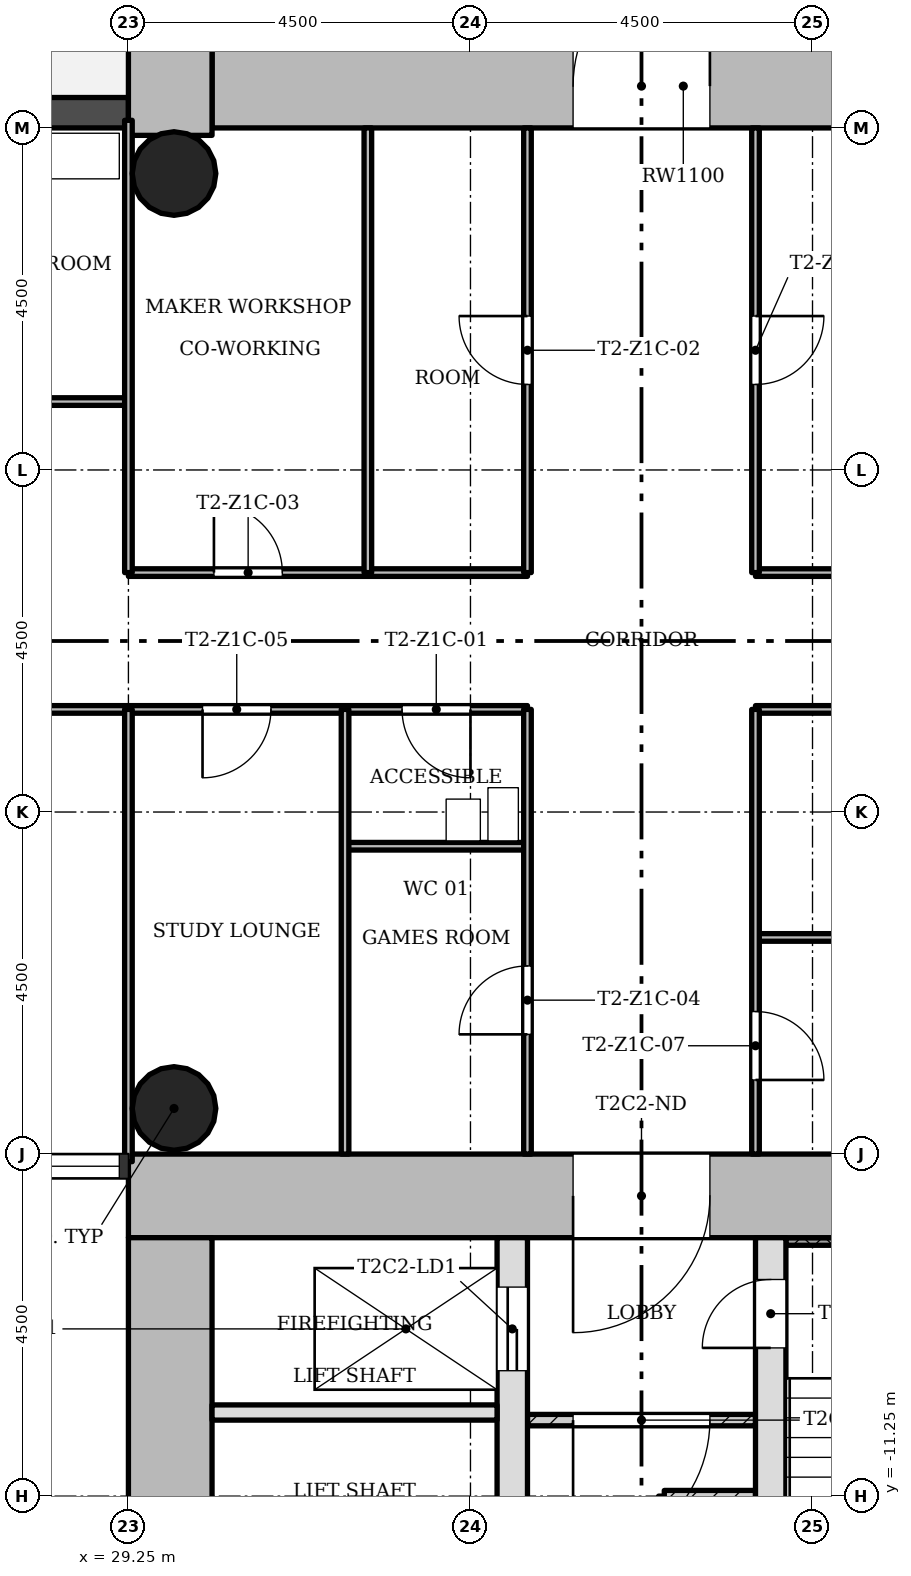
"""IFC4 building model, lengths in metres.
Left out: names, types, materials, properties, quantities, classifications, styles, units other than length and angle.
Written with IfcOpenShell. Run it as: python <this file> out.ifc"""

import sys

from ifc_helpers import new_model, si_unit, direction, frame, frame_2d, origin, origin_2d, place, context, subcontext, project, spatial, rectangle, hollow_circle, extrude, element, fill, save


model = new_model("IFC4")
c1 = context("Model", 3, precision=1e-05, world=origin(), true_north=direction((0.0, 1.0)))
c2 = subcontext(c1, "Body", "Model", "MODEL_VIEW")
j1 = project(units=[si_unit("LENGTHUNIT", "METRE"), si_unit("PLANEANGLEUNIT", "RADIAN")], contexts=[c1])
p1 = place(None, origin())
s1 = spatial("IfcSite", under=j1, at=p1, CompositionType="ELEMENT")
p2 = place(p1, origin())
s2 = spatial("IfcBuilding", under=s1, at=p2, CompositionType="ELEMENT")
p3 = place(p2, frame((0.0, 0.0, 44.9)))
s3 = spatial("IfcBuildingStorey", under=s2, at=p3, CompositionType="ELEMENT", Elevation=44.9)
p4 = place(p3, frame((30.35, 7.3, 0.0), z_axis=(0.0, 0.0, 1.0), x_axis=(1.0, 0.0, 0.0)))
e1 = element("IfcWall", 1, at=p4, inside=s3, PredefinedType="SHEAR", context=c2, shape_type="SweptSolid", body=[
    extrude(rectangle(XDim=12.4, YDim=1.1, at=frame_2d((6.2, 0.0))), origin(), (0.0, 0.0, 1.0), 3.4),
])
p5 = place(p4, frame((4.75, 0.0, 0.0)))
e2 = element("IfcOpeningElement", 2, at=p5, cuts=e1, PredefinedType="OPENING", context=c2, shape_type="SweptSolid", body=[
    extrude(rectangle(XDim=1.8, YDim=2.1, at=frame_2d((0.9, 1.05))), frame((0.0, 0.56, 0.0), z_axis=(0.0, -1.0, 0.0), x_axis=(1.0, 0.0, 0.0)), (0.0, 0.0, 1.0), 1.12),
])
p6 = place(p3, frame((29.8, 15.248, 0.0), z_axis=(0.0, 0.0, 1.0), x_axis=(0.0, -1.0, 0.0)))
e3 = element("IfcWall", 3, at=p6, inside=s3, PredefinedType="SHEAR", context=c2, shape_type="SweptSolid", body=[
    extrude(rectangle(XDim=8.596, YDim=1.1, at=frame_2d((4.298, 0.0))), origin(), (0.0, 0.0, 1.0), 3.4),
])
p7 = place(p3, frame((41.65, -7.3, 0.0), z_axis=(0.0, 0.0, 1.0), x_axis=(-1.0, 0.0, 0.0)))
e4 = element("IfcWall", 4, at=p7, inside=s3, PredefinedType="SHEAR", context=c2, shape_type="SweptSolid", body=[
    extrude(rectangle(XDim=12.4, YDim=1.1, at=frame_2d((6.2, 0.0))), origin(), (0.0, 0.0, 1.0), 3.4),
])
p8 = place(p7, frame((4.75, 0.0, 0.0)))
e5 = element("IfcOpeningElement", 5, at=p8, cuts=e4, PredefinedType="OPENING", context=c2, shape_type="SweptSolid", body=[
    extrude(rectangle(XDim=1.8, YDim=2.1, at=frame_2d((0.9, 1.05))), frame((0.0, 0.56, 0.0), z_axis=(0.0, -1.0, 0.0), x_axis=(1.0, 0.0, 0.0)), (0.0, 0.0, 1.0), 1.12),
])
p9 = place(p3, frame((29.8, -7.85, 0.0), z_axis=(0.0, 0.0, 1.0), x_axis=(0.0, -1.0, 0.0)))
e6 = element("IfcWall", 6, at=p9, inside=s3, PredefinedType="SHEAR", context=c2, shape_type="SweptSolid", body=[
    extrude(rectangle(XDim=7.9, YDim=1.1, at=frame_2d((3.95, 0.0))), origin(), (0.0, 0.0, 1.0), 3.4),
])
p10 = place(p3, frame((34.3, -14.65, 0.0), z_axis=(0.0, 0.0, 1.0), x_axis=(0.0, 1.0, 0.0)))
e7 = element("IfcWall", 7, at=p10, inside=s3, PredefinedType="SHEAR", context=c2, shape_type="SweptSolid", body=[
    extrude(rectangle(XDim=6.8, YDim=0.4, at=frame_2d((3.4, 0.0))), origin(), (0.0, 0.0, 1.0), 3.4),
])
p11 = place(p10, frame((5.05, 0.0, 0.0)))
e8 = element("IfcOpeningElement", 8, at=p11, cuts=e7, PredefinedType="OPENING", context=c2, shape_type="SweptSolid", body=[
    extrude(rectangle(XDim=1.1, YDim=2.1, at=frame_2d((0.55, 1.05))), frame((0.0, 0.21, 0.0), z_axis=(0.0, -1.0, 0.0), x_axis=(1.0, 0.0, 0.0)), (0.0, 0.0, 1.0), 0.42),
])
p12 = place(p3, frame((37.7, -14.65, 0.0), z_axis=(0.0, 0.0, 1.0), x_axis=(0.0, 1.0, 0.0)))
e9 = element("IfcWall", 9, at=p12, inside=s3, PredefinedType="SHEAR", context=c2, shape_type="SweptSolid", body=[
    extrude(rectangle(XDim=6.8, YDim=0.4, at=frame_2d((3.4, 0.0))), origin(), (0.0, 0.0, 1.0), 3.4),
])
p13 = place(p12, frame((5.35, 0.0, 0.0)))
e10 = element("IfcOpeningElement", 10, at=p13, cuts=e9, PredefinedType="OPENING", context=c2, shape_type="SweptSolid", body=[
    extrude(rectangle(XDim=0.9, YDim=2.1, at=frame_2d((0.45, 1.05))), frame((0.0, 0.21, 0.0), z_axis=(0.0, -1.0, 0.0), x_axis=(1.0, 0.0, 0.0)), (0.0, 0.0, 1.0), 0.42),
])
for number, where, z_axis, x_axis in (
    (11, (29.85, 6.15, 0.0), (0.0, 0.0, 1.0), (1.0, 0.0, 0.0)),
    (12, (29.85, -6.15, 0.0), (0.0, 0.0, 1.0), (1.0, 0.0, 0.0)),
):
    element("IfcColumn", number, at=place(p3, frame(where, z_axis=z_axis, x_axis=x_axis)), inside=s3, PredefinedType="COLUMN", context=c2, shape_type="SweptSolid", body=[
        extrude(hollow_circle(Radius=0.55, WallThickness=0.04, at=origin_2d()), origin(), (0.0, 0.0, 1.0), 3.4),
    ])
p14 = place(p3, frame((29.25, 6.95, -0.02), z_axis=(0.0, 0.0, 1.0), x_axis=(-1.0, 0.0, 0.0)))
e13 = element("IfcWall", 13, at=p14, inside=s3, PredefinedType="STANDARD", context=c2, shape_type="SweptSolid", body=[
    extrude(rectangle(XDim=4.5, YDim=0.4, at=frame_2d((2.25, 0.0))), origin(), (0.0, 0.0, 1.0), 3.12),
])
p15 = place(p14, frame((1.35, 0.0, 0.02)))
e14 = element("IfcOpeningElement", 14, at=p15, cuts=e13, PredefinedType="OPENING", context=c2, shape_type="SweptSolid", body=[
    extrude(rectangle(XDim=1.8, YDim=2.1, at=frame_2d((0.9, 1.05))), frame((0.0, 0.21, 0.0), z_axis=(0.0, -1.0, 0.0), x_axis=(1.0, 0.0, 0.0)), (0.0, 0.0, 1.0), 0.42),
])
p16 = place(p3, frame((34.5, -10.25, 0.0), z_axis=(0.0, 0.0, 1.0), x_axis=(1.0, 0.0, 0.0)))
e15 = element("IfcWall", 15, at=p16, inside=s3, PredefinedType="PARTITIONING", context=c2, shape_type="SweptSolid", body=[
    extrude(rectangle(XDim=3.0, YDim=0.15, at=frame_2d((1.5, 0.0))), origin(), (0.0, 0.0, 1.0), 3.0),
])
p17 = place(p16, frame((0.6, 0.0, 0.0)))
e16 = element("IfcOpeningElement", 16, at=p17, cuts=e15, PredefinedType="OPENING", context=c2, shape_type="SweptSolid", body=[
    extrude(rectangle(XDim=1.8, YDim=2.1, at=frame_2d((0.9, 1.05))), frame((0.0, 0.085, 0.0), z_axis=(0.0, -1.0, 0.0), x_axis=(1.0, 0.0, 0.0)), (0.0, 0.0, 1.0), 0.17),
])
p18 = place(p3, frame((30.35, -10.15, 0.0), z_axis=(0.0, 0.0, 1.0), x_axis=(1.0, 0.0, 0.0)))
e17 = element("IfcWall", 17, at=p18, inside=s3, PredefinedType="SOLIDWALL", context=c2, shape_type="SweptSolid", body=[
    extrude(rectangle(XDim=3.75, YDim=0.2, at=frame_2d((1.875, 0.0))), origin(), (0.0, 0.0, 1.0), 3.0),
])
p19 = place(p3, frame((36.3, -11.25, 0.0), z_axis=(0.0, 0.0, 1.0), x_axis=(1.0, 0.0, 0.0)))
e18 = element("IfcWall", 18, at=p19, inside=s3, PredefinedType="PARTITIONING", context=c2, shape_type="SweptSolid", body=[
    extrude(rectangle(XDim=1.2, YDim=0.15, at=frame_2d((0.6, 0.0))), origin(), (0.0, 0.0, 1.0), 3.0),
])
p20 = place(p3, frame((42.75, -3.9, 0.0), z_axis=(0.0, 0.0, 1.0), x_axis=(-1.0, 0.0, 0.0)))
e19 = element("IfcWall", 19, at=p20, inside=s3, PredefinedType="PARTITIONING", context=c2, shape_type="SweptSolid", body=[
    extrude(rectangle(XDim=5.25, YDim=0.1, at=frame_2d((2.625, 0.0))), origin(), (0.0, 0.0, 1.0), 3.0),
])
p21 = place(p3, frame((34.5, -2.7, 0.0), z_axis=(0.0, 0.0, 1.0), x_axis=(-1.0, 0.0, 0.0)))
e20 = element("IfcWall", 20, at=p21, inside=s3, PredefinedType="PARTITIONING", context=c2, shape_type="SweptSolid", body=[
    extrude(rectangle(XDim=2.4, YDim=0.1, at=frame_2d((1.2, 0.0))), origin(), (0.0, 0.0, 1.0), 3.0),
])
p22 = place(p3, frame((44.55, -0.9, 0.0), z_axis=(0.0, 0.0, 1.0), x_axis=(-1.0, 0.0, 0.0)))
e21 = element("IfcWall", 21, at=p22, inside=s3, PredefinedType="PARTITIONING", context=c2, shape_type="SweptSolid", body=[
    extrude(rectangle(XDim=7.05, YDim=0.1, at=frame_2d((3.525, 0.0))), origin(), (0.0, 0.0, 1.0), 3.0),
])
p23 = place(p22, frame((3.975, 0.0, 0.0)))
e22 = element("IfcOpeningElement", 22, at=p23, cuts=e21, PredefinedType="OPENING", context=c2, shape_type="SweptSolid", body=[
    extrude(rectangle(XDim=0.9, YDim=2.1, at=frame_2d((0.45, 1.05))), frame((0.0, 0.06, 0.0), z_axis=(0.0, -1.0, 0.0), x_axis=(1.0, 0.0, 0.0)), (0.0, 0.0, 1.0), 0.12),
])
p24 = place(p3, frame((34.5, -0.9, 0.0), z_axis=(0.0, 0.0, 1.0), x_axis=(-1.0, 0.0, 0.0)))
e23 = element("IfcWall", 23, at=p24, inside=s3, PredefinedType="PARTITIONING", context=c2, shape_type="SweptSolid", body=[
    extrude(rectangle(XDim=7.05, YDim=0.1, at=frame_2d((3.525, 0.0))), origin(), (0.0, 0.0, 1.0), 3.0),
])
p25 = place(p24, frame((0.75, 0.0, 0.0)))
e24 = element("IfcOpeningElement", 24, at=p25, cuts=e23, PredefinedType="OPENING", context=c2, shape_type="SweptSolid", body=[
    extrude(rectangle(XDim=0.9, YDim=2.1, at=frame_2d((0.45, 1.05))), frame((0.0, 0.06, 0.0), z_axis=(0.0, -1.0, 0.0), x_axis=(1.0, 0.0, 0.0)), (0.0, 0.0, 1.0), 0.12),
])
p26 = place(p24, frame((3.375, 0.0, 0.0)))
e25 = element("IfcOpeningElement", 25, at=p26, cuts=e23, PredefinedType="OPENING", context=c2, shape_type="SweptSolid", body=[
    extrude(rectangle(XDim=0.9, YDim=2.1, at=frame_2d((0.45, 1.05))), frame((0.0, 0.06, 0.0), z_axis=(0.0, -1.0, 0.0), x_axis=(1.0, 0.0, 0.0)), (0.0, 0.0, 1.0), 0.12),
])
p27 = place(p3, frame((42.75, 0.9, 0.0), z_axis=(0.0, 0.0, 1.0), x_axis=(-1.0, 0.0, 0.0)))
e26 = element("IfcWall", 26, at=p27, inside=s3, PredefinedType="PARTITIONING", context=c2, shape_type="SweptSolid", body=[
    extrude(rectangle(XDim=5.25, YDim=0.1, at=frame_2d((2.625, 0.0))), origin(), (0.0, 0.0, 1.0), 3.0),
])
p28 = place(p3, frame((34.5, 0.9, 0.0), z_axis=(0.0, 0.0, 1.0), x_axis=(-1.0, 0.0, 0.0)))
e27 = element("IfcWall", 27, at=p28, inside=s3, PredefinedType="PARTITIONING", context=c2, shape_type="SweptSolid", body=[
    extrude(rectangle(XDim=5.25, YDim=0.1, at=frame_2d((2.625, 0.0))), origin(), (0.0, 0.0, 1.0), 3.0),
])
p29 = place(p28, frame((3.225, 0.0, 0.0)))
e28 = element("IfcOpeningElement", 28, at=p29, cuts=e27, PredefinedType="OPENING", context=c2, shape_type="SweptSolid", body=[
    extrude(rectangle(XDim=0.9, YDim=2.1, at=frame_2d((0.45, 1.05))), frame((0.0, 0.06, 0.0), z_axis=(0.0, -1.0, 0.0), x_axis=(1.0, 0.0, 0.0)), (0.0, 0.0, 1.0), 0.12),
])
p30 = place(p3, frame((29.25, 3.15, 0.0), z_axis=(0.0, 0.0, 1.0), x_axis=(-1.0, 0.0, 0.0)))
e29 = element("IfcWall", 29, at=p30, inside=s3, PredefinedType="PARTITIONING", context=c2, shape_type="SweptSolid", body=[
    extrude(rectangle(XDim=9.0, YDim=0.1, at=frame_2d((4.5, 0.0))), origin(), (0.0, 0.0, 1.0), 3.0),
])
p31 = place(p30, frame((1.8, 0.0, 0.0)))
e30 = element("IfcOpeningElement", 30, at=p31, cuts=e29, PredefinedType="OPENING", context=c2, shape_type="SweptSolid", body=[
    extrude(rectangle(XDim=0.9, YDim=2.1, at=frame_2d((0.45, 1.05))), frame((0.0, 0.06, 0.0), z_axis=(0.0, -1.0, 0.0), x_axis=(1.0, 0.0, 0.0)), (0.0, 0.0, 1.0), 0.12),
])
p32 = place(p30, frame((6.3, 0.0, 0.0)))
e31 = element("IfcOpeningElement", 31, at=p32, cuts=e29, PredefinedType="OPENING", context=c2, shape_type="SweptSolid", body=[
    extrude(rectangle(XDim=0.9, YDim=2.1, at=frame_2d((0.45, 1.05))), frame((0.0, 0.06, 0.0), z_axis=(0.0, -1.0, 0.0), x_axis=(1.0, 0.0, 0.0)), (0.0, 0.0, 1.0), 0.12),
])
p33 = place(p3, frame((37.5, -6.75, 0.0), z_axis=(0.0, 0.0, 1.0), x_axis=(0.0, 1.0, 0.0)))
e32 = element("IfcWall", 32, at=p33, inside=s3, PredefinedType="PARTITIONING", context=c2, shape_type="SweptSolid", body=[
    extrude(rectangle(XDim=5.85, YDim=0.1, at=frame_2d((2.925, 0.0))), origin(), (0.0, 0.0, 1.0), 3.0),
])
p34 = place(p33, frame((0.975, 0.0, 0.0)))
e33 = element("IfcOpeningElement", 33, at=p34, cuts=e32, PredefinedType="OPENING", context=c2, shape_type="SweptSolid", body=[
    extrude(rectangle(XDim=0.9, YDim=2.1, at=frame_2d((0.45, 1.05))), frame((0.0, 0.06, 0.0), z_axis=(0.0, -1.0, 0.0), x_axis=(1.0, 0.0, 0.0)), (0.0, 0.0, 1.0), 0.12),
])
p35 = place(p3, frame((37.5, 0.9, 0.0), z_axis=(0.0, 0.0, 1.0), x_axis=(0.0, 1.0, 0.0)))
e34 = element("IfcWall", 34, at=p35, inside=s3, PredefinedType="PARTITIONING", context=c2, shape_type="SweptSolid", body=[
    extrude(rectangle(XDim=5.85, YDim=0.1, at=frame_2d((2.925, 0.0))), origin(), (0.0, 0.0, 1.0), 3.0),
])
p36 = place(p35, frame((2.475, 0.0, 0.0)))
e35 = element("IfcOpeningElement", 35, at=p36, cuts=e34, PredefinedType="OPENING", context=c2, shape_type="SweptSolid", body=[
    extrude(rectangle(XDim=0.9, YDim=2.1, at=frame_2d((0.45, 1.05))), frame((0.0, 0.06, 0.0), z_axis=(0.0, -1.0, 0.0), x_axis=(1.0, 0.0, 0.0)), (0.0, 0.0, 1.0), 0.12),
])
p37 = place(p3, frame((34.5, -6.75, 0.0), z_axis=(0.0, 0.0, 1.0), x_axis=(0.0, 1.0, 0.0)))
e36 = element("IfcWall", 36, at=p37, inside=s3, PredefinedType="PARTITIONING", context=c2, shape_type="SweptSolid", body=[
    extrude(rectangle(XDim=5.85, YDim=0.1, at=frame_2d((2.925, 0.0))), origin(), (0.0, 0.0, 1.0), 3.0),
])
p38 = place(p37, frame((1.575, 0.0, 0.0)))
e37 = element("IfcOpeningElement", 37, at=p38, cuts=e36, PredefinedType="OPENING", context=c2, shape_type="SweptSolid", body=[
    extrude(rectangle(XDim=0.9, YDim=2.1, at=frame_2d((0.45, 1.05))), frame((0.0, 0.06, 0.0), z_axis=(0.0, -1.0, 0.0), x_axis=(1.0, 0.0, 0.0)), (0.0, 0.0, 1.0), 0.12),
])
p39 = place(p3, frame((34.5, 0.9, 0.0), z_axis=(0.0, 0.0, 1.0), x_axis=(0.0, 1.0, 0.0)))
e38 = element("IfcWall", 38, at=p39, inside=s3, PredefinedType="PARTITIONING", context=c2, shape_type="SweptSolid", body=[
    extrude(rectangle(XDim=5.85, YDim=0.1, at=frame_2d((2.925, 0.0))), origin(), (0.0, 0.0, 1.0), 3.0),
])
p40 = place(p39, frame((2.475, 0.0, 0.0)))
e39 = element("IfcOpeningElement", 39, at=p40, cuts=e38, PredefinedType="OPENING", context=c2, shape_type="SweptSolid", body=[
    extrude(rectangle(XDim=0.9, YDim=2.1, at=frame_2d((0.45, 1.05))), frame((0.0, 0.06, 0.0), z_axis=(0.0, -1.0, 0.0), x_axis=(1.0, 0.0, 0.0)), (0.0, 0.0, 1.0), 0.12),
])
for number, where, z_axis, x_axis in (
    (40, (32.4, 0.9, 0.0), (0.0, 0.0, 1.0), (0.0, 1.0, 0.0)),
    (41, (32.1, -6.75, 0.0), (0.0, 0.0, 1.0), (0.0, 1.0, 0.0)),
):
    element("IfcWall", number, at=place(p3, frame(where, z_axis=z_axis, x_axis=x_axis)), inside=s3, PredefinedType="PARTITIONING", context=c2, shape_type="SweptSolid", body=[
        extrude(rectangle(XDim=5.85, YDim=0.1, at=frame_2d((2.925, 0.0))), origin(), (0.0, 0.0, 1.0), 3.0),
    ])
for number, where, z_axis, x_axis in (
    (42, (29.25, -6.85, 0.0), (0.0, 0.0, 1.0), (0.0, 1.0, 0.0)),
    (43, (29.25, 0.9, 0.0), (0.0, 0.0, 1.0), (0.0, 1.0, 0.0)),
):
    element("IfcWall", number, at=place(p3, frame(where, z_axis=z_axis, x_axis=x_axis)), inside=s3, PredefinedType="PARTITIONING", context=c2, shape_type="SweptSolid", body=[
        extrude(rectangle(XDim=5.95, YDim=0.1, at=frame_2d((2.975, 0.0))), origin(), (0.0, 0.0, 1.0), 3.0),
    ])
p41 = place(p3, frame((37.9, -7.9, 0.0), z_axis=(0.0, 0.0, 1.0), x_axis=(1.0, 0.0, 0.0)))
e44 = element("IfcWall", 44, at=p41, inside=s3, PredefinedType="SHEAR", context=c2, shape_type="SweptSolid", body=[
    extrude(rectangle(XDim=3.75, YDim=0.1, at=frame_2d((1.875, 0.0))), origin(), (0.0, 0.0, 1.0), 3.4),
])
p42 = place(p17, origin())
e45 = element("IfcDoor", 45, at=p42, inside=s3, OperationType="SINGLE_SWING_LEFT", PredefinedType="DOOR", context=c2, shape_type="SweptSolid", body=[
    extrude(rectangle(XDim=1.8, YDim=2.1, at=frame_2d((0.9, 1.05))), frame((0.0, 0.025, 0.0), z_axis=(0.0, -1.0, 0.0), x_axis=(1.0, 0.0, 0.0)), (0.0, 0.0, 1.0), 0.05),
])
fill(e16, e45)
p43 = place(p25, origin())
e46 = element("IfcDoor", 46, at=p43, inside=s3, OperationType="SINGLE_SWING_RIGHT", PredefinedType="DOOR", context=c2, shape_type="SweptSolid", body=[
    extrude(rectangle(XDim=0.9, YDim=2.1, at=frame_2d((0.45, 1.05))), frame((0.0, 0.025, 0.0), z_axis=(0.0, -1.0, 0.0), x_axis=(1.0, 0.0, 0.0)), (0.0, 0.0, 1.0), 0.05),
])
fill(e24, e46)
p44 = place(p40, origin())
e47 = element("IfcDoor", 47, at=p44, inside=s3, OperationType="SINGLE_SWING_LEFT", PredefinedType="DOOR", context=c2, shape_type="SweptSolid", body=[
    extrude(rectangle(XDim=0.9, YDim=2.1, at=frame_2d((0.45, 1.05))), frame((0.0, 0.025, 0.0), z_axis=(0.0, -1.0, 0.0), x_axis=(1.0, 0.0, 0.0)), (0.0, 0.0, 1.0), 0.05),
])
fill(e39, e47)
p45 = place(p29, origin())
e48 = element("IfcDoor", 48, at=p45, inside=s3, OperationType="SINGLE_SWING_RIGHT", PredefinedType="DOOR", context=c2, shape_type="SweptSolid", body=[
    extrude(rectangle(XDim=0.9, YDim=2.1, at=frame_2d((0.45, 1.05))), frame((0.0, 0.025, 0.0), z_axis=(0.0, -1.0, 0.0), x_axis=(1.0, 0.0, 0.0)), (0.0, 0.0, 1.0), 0.05),
])
fill(e28, e48)
p46 = place(p38, origin())
e49 = element("IfcDoor", 49, at=p46, inside=s3, OperationType="SINGLE_SWING_RIGHT", PredefinedType="DOOR", context=c2, shape_type="SweptSolid", body=[
    extrude(rectangle(XDim=0.9, YDim=2.1, at=frame_2d((0.45, 1.05))), frame((0.0, 0.025, 0.0), z_axis=(0.0, -1.0, 0.0), x_axis=(1.0, 0.0, 0.0)), (0.0, 0.0, 1.0), 0.05),
])
fill(e37, e49)
p47 = place(p26, origin())
e50 = element("IfcDoor", 50, at=p47, inside=s3, OperationType="SINGLE_SWING_LEFT", PredefinedType="DOOR", context=c2, shape_type="SweptSolid", body=[
    extrude(rectangle(XDim=0.9, YDim=2.1, at=frame_2d((0.45, 1.05))), frame((0.0, 0.025, 0.0), z_axis=(0.0, -1.0, 0.0), x_axis=(1.0, 0.0, 0.0)), (0.0, 0.0, 1.0), 0.05),
])
fill(e25, e50)
p48 = place(p34, origin())
e51 = element("IfcDoor", 51, at=p48, inside=s3, OperationType="SINGLE_SWING_LEFT", PredefinedType="DOOR", context=c2, shape_type="SweptSolid", body=[
    extrude(rectangle(XDim=0.9, YDim=2.1, at=frame_2d((0.45, 1.05))), frame((0.0, 0.025, 0.0), z_axis=(0.0, -1.0, 0.0), x_axis=(1.0, 0.0, 0.0)), (0.0, 0.0, 1.0), 0.05),
])
fill(e33, e51)
p49 = place(p36, origin())
e52 = element("IfcDoor", 52, at=p49, inside=s3, OperationType="SINGLE_SWING_RIGHT", PredefinedType="DOOR", context=c2, shape_type="SweptSolid", body=[
    extrude(rectangle(XDim=0.9, YDim=2.1, at=frame_2d((0.45, 1.05))), frame((0.0, 0.025, 0.0), z_axis=(0.0, -1.0, 0.0), x_axis=(1.0, 0.0, 0.0)), (0.0, 0.0, 1.0), 0.05),
])
fill(e35, e52)
p50 = place(p5, origin())
e53 = element("IfcDoor", 53, at=p50, inside=s3, OperationType="SINGLE_SWING_LEFT", PredefinedType="DOOR", context=c2, shape_type="SweptSolid", body=[
    extrude(rectangle(XDim=1.8, YDim=2.1, at=frame_2d((0.9, 1.05))), frame((0.0, 0.025, 0.0), z_axis=(0.0, -1.0, 0.0), x_axis=(1.0, 0.0, 0.0)), (0.0, 0.0, 1.0), 0.05),
])
fill(e2, e53)
p51 = place(p13, origin())
e54 = element("IfcDoor", 54, at=p51, inside=s3, OperationType="SINGLE_SWING_RIGHT", PredefinedType="DOOR", context=c2, shape_type="SweptSolid", body=[
    extrude(rectangle(XDim=0.9, YDim=2.1, at=frame_2d((0.45, 1.05))), frame((0.0, 0.025, 0.0), z_axis=(0.0, -1.0, 0.0), x_axis=(1.0, 0.0, 0.0)), (0.0, 0.0, 1.0), 0.05),
])
fill(e10, e54)
p52 = place(p11, origin())
e55 = element("IfcDoor", 55, at=p52, inside=s3, OperationType="SLIDING_TO_LEFT", PredefinedType="DOOR", context=c2, shape_type="SweptSolid", body=[
    extrude(rectangle(XDim=1.1, YDim=2.1, at=frame_2d((0.55, 1.05))), frame((0.0, 0.025, 0.0), z_axis=(0.0, -1.0, 0.0), x_axis=(1.0, 0.0, 0.0)), (0.0, 0.0, 1.0), 0.05),
])
fill(e8, e55)
p53 = place(p8, origin())
e56 = element("IfcDoor", 56, at=p53, inside=s3, OperationType="SINGLE_SWING_LEFT", PredefinedType="DOOR", context=c2, shape_type="SweptSolid", body=[
    extrude(rectangle(XDim=1.8, YDim=2.1, at=frame_2d((0.9, 1.05))), frame((0.0, 0.025, 0.0), z_axis=(0.0, -1.0, 0.0), x_axis=(1.0, 0.0, 0.0)), (0.0, 0.0, 1.0), 0.05),
])
fill(e5, e56)
save(model, sys.argv[1])
